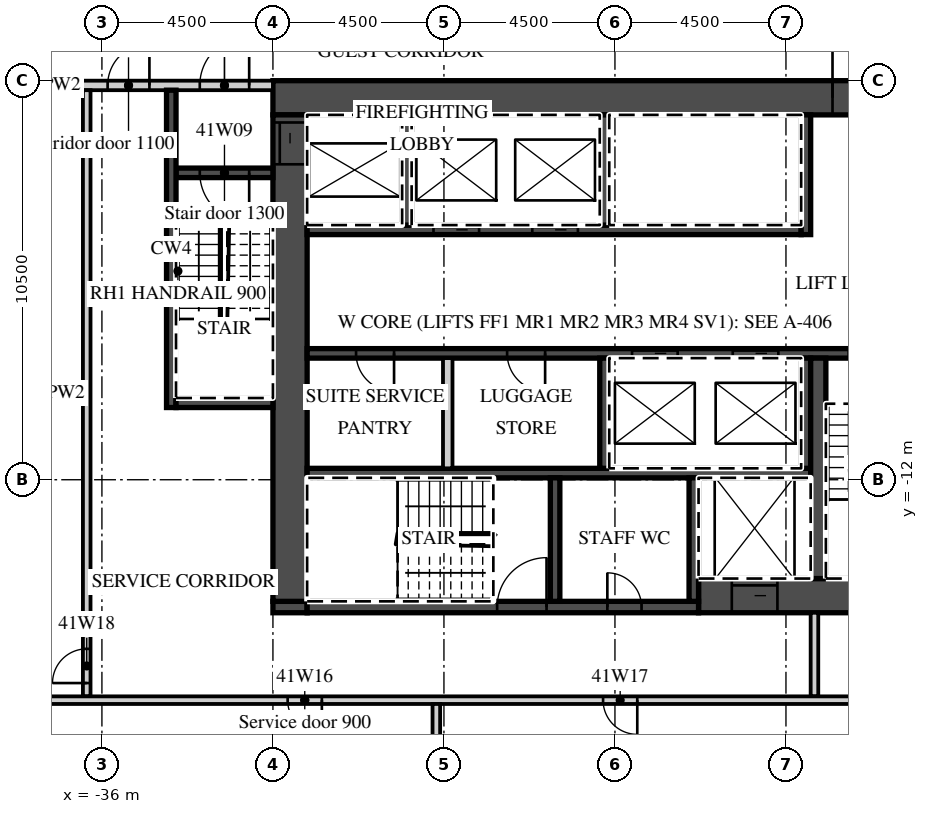
"""IFC4 building model, lengths in metres.
Left out: names, types, materials, properties, quantities, classifications, styles, units other than length and angle.
Written with IfcOpenShell. Run it as: python <this file> out.ifc"""

import sys

from ifc_helpers import new_model, si_unit, direction, frame, frame_2d, origin, place, context, subcontext, project, spatial, rectangle, extrude, element, fill, save


model = new_model("IFC4")
c1 = context("Model", 3, precision=1e-05, world=origin(), true_north=direction((0.0, 1.0)))
c2 = subcontext(c1, "Body", "Model", "MODEL_VIEW")
j1 = project(units=[si_unit("LENGTHUNIT", "METRE"), si_unit("PLANEANGLEUNIT", "RADIAN")], contexts=[c1])
p1 = place(None, origin())
s1 = spatial("IfcSite", under=j1, at=p1, CompositionType="ELEMENT")
p2 = place(p1, origin())
s2 = spatial("IfcBuilding", under=s1, at=p2, CompositionType="ELEMENT")
p3 = place(p2, frame((0.0, 0.0, 176.8)))
s3 = spatial("IfcBuildingStorey", under=s2, at=p3, CompositionType="ELEMENT", Elevation=176.8)
p4 = place(p3, frame((-31.5, -1.95, 0.0), z_axis=(0.0, 0.0, 1.0), x_axis=(1.0, 0.0, 0.0)))
e1 = element("IfcWall", 1, at=p4, inside=s3, PredefinedType="SHEAR", context=c2, shape_type="SweptSolid", body=[
    extrude(rectangle(XDim=18.0, YDim=0.9, at=frame_2d((9.0, 0.0))), origin(), (0.0, 0.0, 1.0), 3.02),
])
p5 = place(p4, frame((14.725, 0.0, 0.0)))
e2 = element("IfcOpeningElement", 2, at=p5, cuts=e1, PredefinedType="OPENING", context=c2, shape_type="SweptSolid", body=[
    extrude(rectangle(XDim=1.8, YDim=2.1, at=frame_2d((0.9, 1.05))), frame((0.0, 0.46, 0.0), z_axis=(0.0, -1.0, 0.0), x_axis=(1.0, 0.0, 0.0)), (0.0, 0.0, 1.0), 0.92),
])
p6 = place(p3, frame((-20.3, -15.05, 0.0), z_axis=(0.0, 0.0, 1.0), x_axis=(1.0, 0.0, 0.0)))
e3 = element("IfcWall", 3, at=p6, inside=s3, PredefinedType="SHEAR", context=c2, shape_type="SweptSolid", body=[
    extrude(rectangle(XDim=6.8, YDim=0.9, at=frame_2d((3.4, 0.0))), origin(), (0.0, 0.0, 1.0), 3.02),
])
p7 = place(p6, frame((0.875, 0.0, 0.0)))
e4 = element("IfcOpeningElement", 4, at=p7, cuts=e3, PredefinedType="OPENING", context=c2, shape_type="SweptSolid", body=[
    extrude(rectangle(XDim=1.2, YDim=2.1, at=frame_2d((0.6, 1.05))), frame((0.0, 0.46, 0.0), z_axis=(0.0, -1.0, 0.0), x_axis=(1.0, 0.0, 0.0)), (0.0, 0.0, 1.0), 0.92),
])
p8 = place(p3, frame((-31.5, -15.35, 0.0), z_axis=(0.0, 0.0, 1.0), x_axis=(1.0, 0.0, 0.0)))
e5 = element("IfcWall", 5, at=p8, inside=s3, PredefinedType="SHEAR", context=c2, shape_type="SweptSolid", body=[
    extrude(rectangle(XDim=0.9, YDim=0.3, at=frame_2d((0.45, 0.0))), origin(), (0.0, 0.0, 1.0), 3.02),
])
p9 = place(p3, frame((-30.6, -15.35, 0.0), z_axis=(0.0, 0.0, 1.0), x_axis=(1.0, 0.0, 0.0)))
e6 = element("IfcWall", 6, at=p9, inside=s3, PredefinedType="SHEAR", context=c2, shape_type="SweptSolid", body=[
    extrude(rectangle(XDim=10.3, YDim=0.3, at=frame_2d((5.15, 0.0))), origin(), (0.0, 0.0, 1.0), 3.02),
])
p10 = place(p9, frame((5.0, 0.0, 0.0)))
e7 = element("IfcOpeningElement", 7, at=p10, cuts=e6, PredefinedType="OPENING", context=c2, shape_type="SweptSolid", body=[
    extrude(rectangle(XDim=1.3, YDim=2.1, at=frame_2d((0.65, 1.05))), frame((0.0, 0.16, 0.0), z_axis=(0.0, -1.0, 0.0), x_axis=(1.0, 0.0, 0.0)), (0.0, 0.0, 1.0), 0.32),
])
p11 = place(p9, frame((7.9, 0.0, 0.0)))
e8 = element("IfcOpeningElement", 8, at=p11, cuts=e6, PredefinedType="OPENING", context=c2, shape_type="SweptSolid", body=[
    extrude(rectangle(XDim=0.9, YDim=2.1, at=frame_2d((0.45, 1.05))), frame((0.0, 0.16, 0.0), z_axis=(0.0, -1.0, 0.0), x_axis=(1.0, 0.0, 0.0)), (0.0, 0.0, 1.0), 0.32),
])
p12 = place(p3, frame((-31.05, -15.2, 0.0), z_axis=(0.0, 0.0, 1.0), x_axis=(0.0, 1.0, 0.0)))
e9 = element("IfcWall", 9, at=p12, inside=s3, PredefinedType="SHEAR", context=c2, shape_type="SweptSolid", body=[
    extrude(rectangle(XDim=12.8, YDim=0.9, at=frame_2d((6.4, 0.0))), origin(), (0.0, 0.0, 1.0), 3.02),
])
p13 = place(p12, frame((11.5, 0.0, 0.0)))
e10 = element("IfcOpeningElement", 10, at=p13, cuts=e9, PredefinedType="OPENING", context=c2, shape_type="SweptSolid", body=[
    extrude(rectangle(XDim=1.1, YDim=2.1, at=frame_2d((0.55, 1.05))), frame((0.0, 0.46, 0.0), z_axis=(0.0, -1.0, 0.0), x_axis=(1.0, 0.0, 0.0)), (0.0, 0.0, 1.0), 0.92),
])
p14 = place(p3, frame((-30.6, -5.425, 0.0), z_axis=(0.0, 0.0, 1.0), x_axis=(1.0, 0.0, 0.0)))
e11 = element("IfcWall", 11, at=p14, inside=s3, PredefinedType="SHEAR", context=c2, shape_type="SweptSolid", body=[
    extrude(rectangle(XDim=13.0, YDim=0.25, at=frame_2d((6.5, 0.0))), origin(), (0.0, 0.0, 1.0), 3.02),
])
p15 = place(p14, frame((3.325, 0.0, 0.0)))
e12 = element("IfcOpeningElement", 12, at=p15, cuts=e11, PredefinedType="OPENING", context=c2, shape_type="SweptSolid", body=[
    extrude(rectangle(XDim=1.2, YDim=2.1, at=frame_2d((0.6, 1.05))), frame((0.0, 0.135, 0.0), z_axis=(0.0, -1.0, 0.0), x_axis=(1.0, 0.0, 0.0)), (0.0, 0.0, 1.0), 0.27),
])
p16 = place(p14, frame((5.925, 0.0, 0.0)))
e13 = element("IfcOpeningElement", 13, at=p16, cuts=e11, PredefinedType="OPENING", context=c2, shape_type="SweptSolid", body=[
    extrude(rectangle(XDim=1.2, YDim=2.1, at=frame_2d((0.6, 1.05))), frame((0.0, 0.135, 0.0), z_axis=(0.0, -1.0, 0.0), x_axis=(1.0, 0.0, 0.0)), (0.0, 0.0, 1.0), 0.27),
])
p17 = place(p3, frame((-17.475, -5.55, 0.0), z_axis=(0.0, 0.0, 1.0), x_axis=(0.0, 1.0, 0.0)))
e14 = element("IfcWall", 14, at=p17, inside=s3, PredefinedType="SHEAR", context=c2, shape_type="SweptSolid", body=[
    extrude(rectangle(XDim=3.15, YDim=0.25, at=frame_2d((1.575, 0.0))), origin(), (0.0, 0.0, 1.0), 3.02),
])
for number, where, z_axis, x_axis in (
    (15, (-27.975, -5.3, 0.0), (0.0, 0.0, 1.0), (0.0, 1.0, 0.0)),
    (16, (-22.775, -5.3, 0.0), (0.0, 0.0, 1.0), (0.0, 1.0, 0.0)),
):
    element("IfcWall", number, at=place(p3, frame(where, z_axis=z_axis, x_axis=x_axis)), inside=s3, PredefinedType="SHEAR", context=c2, shape_type="SweptSolid", body=[
        extrude(rectangle(XDim=2.9, YDim=0.25, at=frame_2d((1.45, 0.0))), origin(), (0.0, 0.0, 1.0), 3.02),
    ])
p18 = place(p3, frame((-30.6, -8.675, 0.0), z_axis=(0.0, 0.0, 1.0), x_axis=(1.0, 0.0, 0.0)))
e17 = element("IfcWall", 17, at=p18, inside=s3, PredefinedType="SHEAR", context=c2, shape_type="SweptSolid", body=[
    extrude(rectangle(XDim=16.2, YDim=0.25, at=frame_2d((8.1, 0.0))), origin(), (0.0, 0.0, 1.0), 3.02),
])
p19 = place(p18, frame((8.55, 0.0, 0.0)))
e18 = element("IfcOpeningElement", 18, at=p19, cuts=e17, PredefinedType="OPENING", context=c2, shape_type="SweptSolid", body=[
    extrude(rectangle(XDim=1.2, YDim=2.1, at=frame_2d((0.6, 1.05))), frame((0.0, 0.135, 0.0), z_axis=(0.0, -1.0, 0.0), x_axis=(1.0, 0.0, 0.0)), (0.0, 0.0, 1.0), 0.27),
])
p20 = place(p18, frame((11.2, 0.0, 0.0)))
e19 = element("IfcOpeningElement", 19, at=p20, cuts=e17, PredefinedType="OPENING", context=c2, shape_type="SweptSolid", body=[
    extrude(rectangle(XDim=1.2, YDim=2.1, at=frame_2d((0.6, 1.05))), frame((0.0, 0.135, 0.0), z_axis=(0.0, -1.0, 0.0), x_axis=(1.0, 0.0, 0.0)), (0.0, 0.0, 1.0), 0.27),
])
p21 = place(p18, frame((14.25, 0.0, 0.0)))
e20 = element("IfcOpeningElement", 20, at=p21, cuts=e17, PredefinedType="OPENING", context=c2, shape_type="SweptSolid", body=[
    extrude(rectangle(XDim=1.3, YDim=2.1, at=frame_2d((0.65, 1.05))), frame((0.0, 0.135, 0.0), z_axis=(0.0, -1.0, 0.0), x_axis=(1.0, 0.0, 0.0)), (0.0, 0.0, 1.0), 0.27),
])
p22 = place(p18, frame((1.288, 0.0, 0.0)))
e21 = element("IfcOpeningElement", 21, at=p22, cuts=e17, PredefinedType="OPENING", context=c2, shape_type="SweptSolid", body=[
    extrude(rectangle(XDim=1.0, YDim=2.1, at=frame_2d((0.5, 1.05))), frame((0.0, 0.135, 0.0), z_axis=(0.0, -1.0, 0.0), x_axis=(1.0, 0.0, 0.0)), (0.0, 0.0, 1.0), 0.27),
])
p23 = place(p18, frame((5.262, 0.0, 0.0)))
e22 = element("IfcOpeningElement", 22, at=p23, cuts=e17, PredefinedType="OPENING", context=c2, shape_type="SweptSolid", body=[
    extrude(rectangle(XDim=1.0, YDim=2.1, at=frame_2d((0.5, 1.05))), frame((0.0, 0.135, 0.0), z_axis=(0.0, -1.0, 0.0), x_axis=(1.0, 0.0, 0.0)), (0.0, 0.0, 1.0), 0.27),
])
p24 = place(p3, frame((-30.6, -11.825, 0.0), z_axis=(0.0, 0.0, 1.0), x_axis=(1.0, 0.0, 0.0)))
e23 = element("IfcWall", 23, at=p24, inside=s3, PredefinedType="SHEAR", context=c2, shape_type="SweptSolid", body=[
    extrude(rectangle(XDim=13.25, YDim=0.25, at=frame_2d((6.625, 0.0))), origin(), (0.0, 0.0, 1.0), 3.02),
])
for number, where, z_axis, x_axis in (
    (24, (-17.475, -11.7, 0.0), (0.0, 0.0, 1.0), (0.0, 1.0, 0.0)),
    (25, (-22.775, -11.7, 0.0), (0.0, 0.0, 1.0), (0.0, 1.0, 0.0)),
):
    element("IfcWall", number, at=place(p3, frame(where, z_axis=z_axis, x_axis=x_axis)), inside=s3, PredefinedType="SHEAR", context=c2, shape_type="SweptSolid", body=[
        extrude(rectangle(XDim=2.9, YDim=0.25, at=frame_2d((1.45, 0.0))), origin(), (0.0, 0.0, 1.0), 3.02),
    ])
p25 = place(p3, frame((-26.9, -11.7, 0.0), z_axis=(0.0, 0.0, 1.0), x_axis=(0.0, 1.0, 0.0)))
e26 = element("IfcWall", 26, at=p25, inside=s3, PredefinedType="PARTITIONING", context=c2, shape_type="SweptSolid", body=[
    extrude(rectangle(XDim=2.9, YDim=0.25, at=frame_2d((1.45, 0.0))), origin(), (0.0, 0.0, 1.0), 3.02),
])
p26 = place(p3, frame((-17.15, -14.6, 0.0), z_axis=(0.0, 0.0, 1.0), x_axis=(0.0, 1.0, 0.0)))
e27 = element("IfcWall", 27, at=p26, inside=s3, PredefinedType="SHEAR", context=c2, shape_type="SweptSolid", body=[
    extrude(rectangle(XDim=5.8, YDim=0.4, at=frame_2d((2.9, 0.0))), origin(), (0.0, 0.0, 1.0), 3.02),
])
for number, where, z_axis, x_axis in (
    (28, (-20.425, -15.2, 0.0), (0.0, 0.0, 1.0), (0.0, 1.0, 0.0)),
    (29, (-24.075, -15.2, 0.0), (0.0, 0.0, 1.0), (0.0, 1.0, 0.0)),
):
    element("IfcWall", number, at=place(p3, frame(where, z_axis=z_axis, x_axis=x_axis)), inside=s3, PredefinedType="SHEAR", context=c2, shape_type="SweptSolid", body=[
        extrude(rectangle(XDim=3.25, YDim=0.25, at=frame_2d((1.625, 0.0))), origin(), (0.0, 0.0, 1.0), 3.02),
    ])
p27 = place(p3, frame((-42.632, -1.625, 0.0), z_axis=(0.0, 0.0, 1.0), x_axis=(1.0, 0.0, 0.0)))
e30 = element("IfcWall", 30, at=p27, inside=s3, PredefinedType="PARTITIONING", context=c2, shape_type="SweptSolid", body=[
    extrude(rectangle(XDim=11.132, YDim=0.25, at=frame_2d((5.566, 0.0))), origin(), (0.0, 0.0, 1.0), 3.02),
])
p28 = place(p27, frame((9.207, 0.0, 0.0)))
e31 = element("IfcOpeningElement", 31, at=p28, cuts=e30, PredefinedType="OPENING", context=c2, shape_type="SweptSolid", body=[
    extrude(rectangle(XDim=1.3, YDim=2.1, at=frame_2d((0.65, 1.05))), frame((0.0, 0.135, 0.0), z_axis=(0.0, -1.0, 0.0), x_axis=(1.0, 0.0, 0.0)), (0.0, 0.0, 1.0), 0.27),
])
p29 = place(p27, frame((6.781, 0.0, 0.0)))
e32 = element("IfcOpeningElement", 32, at=p29, cuts=e30, PredefinedType="OPENING", context=c2, shape_type="SweptSolid", body=[
    extrude(rectangle(XDim=1.1, YDim=2.1, at=frame_2d((0.55, 1.05))), frame((0.0, 0.135, 0.0), z_axis=(0.0, -1.0, 0.0), x_axis=(1.0, 0.0, 0.0)), (0.0, 0.0, 1.0), 0.27),
])
p30 = place(p3, frame((-34.05, -3.925, 0.0), z_axis=(0.0, 0.0, 1.0), x_axis=(1.0, 0.0, 0.0)))
e33 = element("IfcWall", 33, at=p30, inside=s3, PredefinedType="SHEAR", context=c2, shape_type="SweptSolid", body=[
    extrude(rectangle(XDim=2.55, YDim=0.25, at=frame_2d((1.275, 0.0))), origin(), (0.0, 0.0, 1.0), 3.02),
])
p31 = place(p30, frame((0.625, 0.0, 0.0)))
e34 = element("IfcOpeningElement", 34, at=p31, cuts=e33, PredefinedType="OPENING", context=c2, shape_type="SweptSolid", body=[
    extrude(rectangle(XDim=1.3, YDim=2.1, at=frame_2d((0.65, 1.05))), frame((0.0, 0.135, 0.0), z_axis=(0.0, -1.0, 0.0), x_axis=(1.0, 0.0, 0.0)), (0.0, 0.0, 1.0), 0.27),
])
p32 = place(p3, frame((-34.175, -10.1, 0.0), z_axis=(0.0, 0.0, 1.0), x_axis=(0.0, 1.0, 0.0)))
e35 = element("IfcWall", 35, at=p32, inside=s3, PredefinedType="SHEAR", context=c2, shape_type="SweptSolid", body=[
    extrude(rectangle(XDim=8.35, YDim=0.25, at=frame_2d((4.175, 0.0))), origin(), (0.0, 0.0, 1.0), 3.02),
])
p33 = place(p3, frame((-34.05, -9.975, 0.0), z_axis=(0.0, 0.0, 1.0), x_axis=(1.0, 0.0, 0.0)))
e36 = element("IfcWall", 36, at=p33, inside=s3, PredefinedType="SHEAR", context=c2, shape_type="SweptSolid", body=[
    extrude(rectangle(XDim=2.55, YDim=0.25, at=frame_2d((1.275, 0.0))), origin(), (0.0, 0.0, 1.0), 3.02),
])
p34 = place(p3, frame((-17.25, -17.7, 0.0), z_axis=(0.0, 0.0, 1.0), x_axis=(0.0, 1.0, 0.0)))
e37 = element("IfcWall", 37, at=p34, inside=s3, PredefinedType="PARTITIONING", context=c2, shape_type="SweptSolid", body=[
    extrude(rectangle(XDim=2.2, YDim=0.2, at=frame_2d((1.1, 0.0))), origin(), (0.0, 0.0, 1.0), 3.02),
])
p35 = place(p3, frame((-36.4, -17.7, 0.0), z_axis=(0.0, 0.0, 1.0), x_axis=(0.0, 1.0, 0.0)))
e38 = element("IfcWall", 38, at=p35, inside=s3, PredefinedType="PARTITIONING", context=c2, shape_type="SweptSolid", body=[
    extrude(rectangle(XDim=15.95, YDim=0.2, at=frame_2d((7.975, 0.0))), origin(), (0.0, 0.0, 1.0), 3.02),
])
p36 = place(p35, frame((0.35, 0.0, 0.0)))
e39 = element("IfcOpeningElement", 39, at=p36, cuts=e38, PredefinedType="OPENING", context=c2, shape_type="SweptSolid", body=[
    extrude(rectangle(XDim=0.9, YDim=2.1, at=frame_2d((0.45, 1.05))), frame((0.0, 0.11, 0.0), z_axis=(0.0, -1.0, 0.0), x_axis=(1.0, 0.0, 0.0)), (0.0, 0.0, 1.0), 0.22),
])
p37 = place(p3, frame((-41.074, -17.8, 0.0), z_axis=(0.0, 0.0, 1.0), x_axis=(1.0, 0.0, 0.0)))
e40 = element("IfcWall", 40, at=p37, inside=s3, PredefinedType="PARTITIONING", context=c2, shape_type="SweptSolid", body=[
    extrude(rectangle(XDim=27.474, YDim=0.2, at=frame_2d((13.737, 0.0))), origin(), (0.0, 0.0, 1.0), 3.02),
])
p38 = place(p37, frame((9.962, 0.0, 0.0)))
e41 = element("IfcOpeningElement", 41, at=p38, cuts=e40, PredefinedType="OPENING", context=c2, shape_type="SweptSolid", body=[
    extrude(rectangle(XDim=0.9, YDim=2.1, at=frame_2d((0.45, 1.05))), frame((0.0, 0.11, 0.0), z_axis=(0.0, -1.0, 0.0), x_axis=(1.0, 0.0, 0.0)), (0.0, 0.0, 1.0), 0.22),
])
p39 = place(p37, frame((18.262, 0.0, 0.0)))
e42 = element("IfcOpeningElement", 42, at=p39, cuts=e40, PredefinedType="OPENING", context=c2, shape_type="SweptSolid", body=[
    extrude(rectangle(XDim=0.9, YDim=2.1, at=frame_2d((0.45, 1.05))), frame((0.0, 0.11, 0.0), z_axis=(0.0, -1.0, 0.0), x_axis=(1.0, 0.0, 0.0)), (0.0, 0.0, 1.0), 0.22),
])
p40 = place(p3, frame((-27.2, -23.621, 0.0), z_axis=(0.0, 0.0, 1.0), x_axis=(0.0, 1.0, 0.0)))
e43 = element("IfcWall", 43, at=p40, inside=s3, PredefinedType="PARTITIONING", context=c2, shape_type="SweptSolid", body=[
    extrude(rectangle(XDim=5.721, YDim=0.2, at=frame_2d((2.86, 0.0))), origin(), (0.0, 0.0, 1.0), 3.02),
])
p41 = place(p19, origin())
e44 = element("IfcDoor", 44, at=p41, inside=s3, OperationType="SLIDING_TO_LEFT", PredefinedType="DOOR", context=c2, shape_type="SweptSolid", body=[
    extrude(rectangle(XDim=1.2, YDim=2.1, at=frame_2d((0.6, 1.05))), frame((0.0, 0.025, 0.0), z_axis=(0.0, -1.0, 0.0), x_axis=(1.0, 0.0, 0.0)), (0.0, 0.0, 1.0), 0.05),
])
fill(e18, e44)
p42 = place(p20, origin())
e45 = element("IfcDoor", 45, at=p42, inside=s3, OperationType="SLIDING_TO_RIGHT", PredefinedType="DOOR", context=c2, shape_type="SweptSolid", body=[
    extrude(rectangle(XDim=1.2, YDim=2.1, at=frame_2d((0.6, 1.05))), frame((0.0, 0.025, 0.0), z_axis=(0.0, -1.0, 0.0), x_axis=(1.0, 0.0, 0.0)), (0.0, 0.0, 1.0), 0.05),
])
fill(e19, e45)
p43 = place(p15, origin())
e46 = element("IfcDoor", 46, at=p43, inside=s3, OperationType="SLIDING_TO_RIGHT", PredefinedType="DOOR", context=c2, shape_type="SweptSolid", body=[
    extrude(rectangle(XDim=1.2, YDim=2.1, at=frame_2d((0.6, 1.05))), frame((0.0, 0.025, 0.0), z_axis=(0.0, -1.0, 0.0), x_axis=(1.0, 0.0, 0.0)), (0.0, 0.0, 1.0), 0.05),
])
fill(e12, e46)
p44 = place(p16, origin())
e47 = element("IfcDoor", 47, at=p44, inside=s3, OperationType="SLIDING_TO_RIGHT", PredefinedType="DOOR", context=c2, shape_type="SweptSolid", body=[
    extrude(rectangle(XDim=1.2, YDim=2.1, at=frame_2d((0.6, 1.05))), frame((0.0, 0.025, 0.0), z_axis=(0.0, -1.0, 0.0), x_axis=(1.0, 0.0, 0.0)), (0.0, 0.0, 1.0), 0.05),
])
fill(e13, e47)
p45 = place(p7, origin())
e48 = element("IfcDoor", 48, at=p45, inside=s3, OperationType="SLIDING_TO_LEFT", PredefinedType="DOOR", context=c2, shape_type="SweptSolid", body=[
    extrude(rectangle(XDim=1.2, YDim=2.1, at=frame_2d((0.6, 1.05))), frame((0.0, 0.025, 0.0), z_axis=(0.0, -1.0, 0.0), x_axis=(1.0, 0.0, 0.0)), (0.0, 0.0, 1.0), 0.05),
])
fill(e4, e48)
p46 = place(p13, origin())
e49 = element("IfcDoor", 49, at=p46, inside=s3, OperationType="SLIDING_TO_RIGHT", PredefinedType="DOOR", context=c2, shape_type="SweptSolid", body=[
    extrude(rectangle(XDim=1.1, YDim=2.1, at=frame_2d((0.55, 1.05))), frame((0.0, 0.025, 0.0), z_axis=(0.0, -1.0, 0.0), x_axis=(1.0, 0.0, 0.0)), (0.0, 0.0, 1.0), 0.05),
])
fill(e10, e49)
p47 = place(p5, origin())
e50 = element("IfcDoor", 50, at=p47, inside=s3, OperationType="DOUBLE_DOOR_DOUBLE_SWING", PredefinedType="DOOR", context=c2, shape_type="SweptSolid", body=[
    extrude(rectangle(XDim=1.8, YDim=2.1, at=frame_2d((0.9, 1.05))), frame((0.0, 0.025, 0.0), z_axis=(0.0, -1.0, 0.0), x_axis=(1.0, 0.0, 0.0)), (0.0, 0.0, 1.0), 0.05),
])
fill(e2, e50)
p48 = place(p28, origin())
e51 = element("IfcDoor", 51, at=p48, inside=s3, OperationType="SINGLE_SWING_RIGHT", PredefinedType="DOOR", context=c2, shape_type="SweptSolid", body=[
    extrude(rectangle(XDim=1.3, YDim=2.1, at=frame_2d((0.65, 1.05))), frame((0.0, 0.025, 0.0), z_axis=(0.0, -1.0, 0.0), x_axis=(1.0, 0.0, 0.0)), (0.0, 0.0, 1.0), 0.05),
])
fill(e31, e51)
p49 = place(p31, origin())
e52 = element("IfcDoor", 52, at=p49, inside=s3, OperationType="SINGLE_SWING_RIGHT", PredefinedType="DOOR", context=c2, shape_type="SweptSolid", body=[
    extrude(rectangle(XDim=1.3, YDim=2.1, at=frame_2d((0.65, 1.05))), frame((0.0, 0.025, 0.0), z_axis=(0.0, -1.0, 0.0), x_axis=(1.0, 0.0, 0.0)), (0.0, 0.0, 1.0), 0.05),
])
fill(e34, e52)
p50 = place(p29, origin())
e53 = element("IfcDoor", 53, at=p50, inside=s3, OperationType="SINGLE_SWING_RIGHT", PredefinedType="DOOR", context=c2, shape_type="SweptSolid", body=[
    extrude(rectangle(XDim=1.1, YDim=2.1, at=frame_2d((0.55, 1.05))), frame((0.0, 0.025, 0.0), z_axis=(0.0, -1.0, 0.0), x_axis=(1.0, 0.0, 0.0)), (0.0, 0.0, 1.0), 0.05),
])
fill(e32, e53)
p51 = place(p21, origin())
e54 = element("IfcDoor", 54, at=p51, inside=s3, OperationType="SINGLE_SWING_RIGHT", PredefinedType="DOOR", context=c2, shape_type="SweptSolid", body=[
    extrude(rectangle(XDim=1.3, YDim=2.1, at=frame_2d((0.65, 1.05))), frame((0.0, 0.025, 0.0), z_axis=(0.0, -1.0, 0.0), x_axis=(1.0, 0.0, 0.0)), (0.0, 0.0, 1.0), 0.05),
])
fill(e20, e54)
p52 = place(p10, origin())
e55 = element("IfcDoor", 55, at=p52, inside=s3, OperationType="SINGLE_SWING_RIGHT", PredefinedType="DOOR", context=c2, shape_type="SweptSolid", body=[
    extrude(rectangle(XDim=1.3, YDim=2.1, at=frame_2d((0.65, 1.05))), frame((0.0, 0.025, 0.0), z_axis=(0.0, -1.0, 0.0), x_axis=(1.0, 0.0, 0.0)), (0.0, 0.0, 1.0), 0.05),
])
fill(e7, e55)
p53 = place(p11, origin())
e56 = element("IfcDoor", 56, at=p53, inside=s3, OperationType="SINGLE_SWING_LEFT", PredefinedType="DOOR", context=c2, shape_type="SweptSolid", body=[
    extrude(rectangle(XDim=0.9, YDim=2.1, at=frame_2d((0.45, 1.05))), frame((0.0, 0.025, 0.0), z_axis=(0.0, -1.0, 0.0), x_axis=(1.0, 0.0, 0.0)), (0.0, 0.0, 1.0), 0.05),
])
fill(e8, e56)
p54 = place(p22, origin())
e57 = element("IfcDoor", 57, at=p54, inside=s3, OperationType="SINGLE_SWING_RIGHT", PredefinedType="DOOR", context=c2, shape_type="SweptSolid", body=[
    extrude(rectangle(XDim=1.0, YDim=2.1, at=frame_2d((0.5, 1.05))), frame((0.0, 0.025, 0.0), z_axis=(0.0, -1.0, 0.0), x_axis=(1.0, 0.0, 0.0)), (0.0, 0.0, 1.0), 0.05),
])
fill(e21, e57)
p55 = place(p23, origin())
e58 = element("IfcDoor", 58, at=p55, inside=s3, OperationType="SINGLE_SWING_RIGHT", PredefinedType="DOOR", context=c2, shape_type="SweptSolid", body=[
    extrude(rectangle(XDim=1.0, YDim=2.1, at=frame_2d((0.5, 1.05))), frame((0.0, 0.025, 0.0), z_axis=(0.0, -1.0, 0.0), x_axis=(1.0, 0.0, 0.0)), (0.0, 0.0, 1.0), 0.05),
])
fill(e22, e58)
p56 = place(p38, origin())
e59 = element("IfcDoor", 59, at=p56, inside=s3, OperationType="SINGLE_SWING_RIGHT", PredefinedType="DOOR", context=c2, shape_type="SweptSolid", body=[
    extrude(rectangle(XDim=0.9, YDim=2.1, at=frame_2d((0.45, 1.05))), frame((0.0, 0.025, 0.0), z_axis=(0.0, -1.0, 0.0), x_axis=(1.0, 0.0, 0.0)), (0.0, 0.0, 1.0), 0.05),
])
fill(e41, e59)
p57 = place(p39, origin())
e60 = element("IfcDoor", 60, at=p57, inside=s3, OperationType="SINGLE_SWING_RIGHT", PredefinedType="DOOR", context=c2, shape_type="SweptSolid", body=[
    extrude(rectangle(XDim=0.9, YDim=2.1, at=frame_2d((0.45, 1.05))), frame((0.0, 0.025, 0.0), z_axis=(0.0, -1.0, 0.0), x_axis=(1.0, 0.0, 0.0)), (0.0, 0.0, 1.0), 0.05),
])
fill(e42, e60)
p58 = place(p36, origin())
e61 = element("IfcDoor", 61, at=p58, inside=s3, OperationType="SINGLE_SWING_LEFT", PredefinedType="DOOR", context=c2, shape_type="SweptSolid", body=[
    extrude(rectangle(XDim=0.9, YDim=2.1, at=frame_2d((0.45, 1.05))), frame((0.0, 0.025, 0.0), z_axis=(0.0, -1.0, 0.0), x_axis=(1.0, 0.0, 0.0)), (0.0, 0.0, 1.0), 0.05),
])
fill(e39, e61)
save(model, sys.argv[1])
